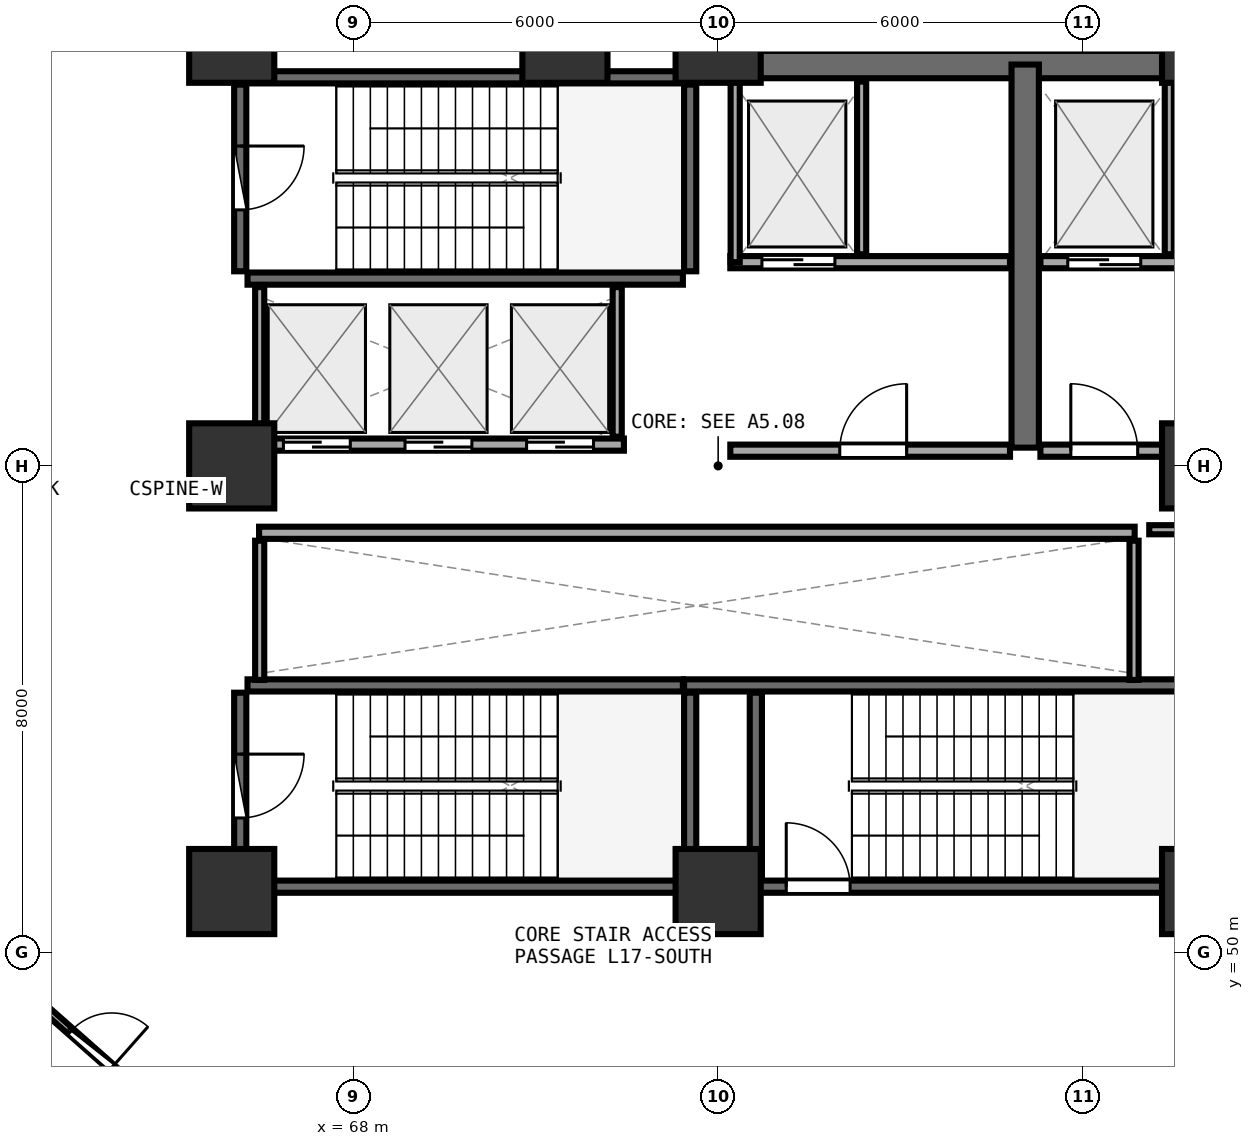
"""IFC4 building model, lengths in metres.
Left out: names, types, materials, properties, quantities, classifications, styles, units other than length and angle.
Written with IfcOpenShell. Run it as: python <this file> out.ifc"""

import sys

from ifc_helpers import new_model, si_unit, direction, frame, frame_2d, origin, origin_2d, place, context, subcontext, project, spatial, rectangle, extrude, element, fill, save


model = new_model("IFC4")
c1 = context("Model", 3, precision=1e-05, world=origin(), true_north=direction((0.0, 1.0)))
c2 = subcontext(c1, "Body", "Model", "MODEL_VIEW")
j1 = project(units=[si_unit("LENGTHUNIT", "METRE"), si_unit("PLANEANGLEUNIT", "RADIAN")], contexts=[c1])
p1 = place(None, origin())
s1 = spatial("IfcSite", under=j1, at=p1, CompositionType="ELEMENT")
p2 = place(p1, origin())
s2 = spatial("IfcBuilding", under=s1, at=p2, CompositionType="ELEMENT")
p3 = place(p2, frame((0.0, 0.0, 67.5)))
s3 = spatial("IfcBuildingStorey", under=s2, at=p3, CompositionType="ELEMENT", Elevation=67.5)
for number, where, z_axis, x_axis in (
    (1, (66.0, 51.0, 0.0), (0.0, 0.0, 1.0), (1.0, 0.0, 0.0)),
    (2, (74.0, 51.0, 0.0), (0.0, 0.0, 1.0), (1.0, 0.0, 0.0)),
    (3, (82.0, 51.0, 0.0), (0.0, 0.0, 1.0), (1.0, 0.0, 0.0)),
    (4, (82.0, 58.0, 0.0), (0.0, 0.0, 1.0), (1.0, 0.0, 0.0)),
    (5, (82.0, 65.0, 0.0), (0.0, 0.0, 1.0), (1.0, 0.0, 0.0)),
    (6, (74.0, 65.0, 0.0), (0.0, 0.0, 1.0), (1.0, 0.0, 0.0)),
    (7, (71.48, 65.0, 0.0), (0.0, 0.0, 1.0), (1.0, 0.0, 0.0)),
    (8, (66.0, 65.0, 0.0), (0.0, 0.0, 1.0), (1.0, 0.0, 0.0)),
    (9, (66.0, 58.0, 0.0), (0.0, 0.0, 1.0), (1.0, 0.0, 0.0)),
):
    element("IfcColumn", number, at=place(p3, frame(where, z_axis=z_axis, x_axis=x_axis)), inside=s3, PredefinedType="PILASTER", context=c2, shape_type="SweptSolid", body=[
        extrude(rectangle(XDim=1.4, YDim=1.4, at=origin_2d()), origin(), (0.0, 0.0, 1.0), 4.76),
    ])
p4 = place(p3, frame((66.26, 61.08, 0.0), z_axis=(0.0, 0.0, 1.0), x_axis=(1.0, 0.0, 0.0)))
e10 = element("IfcWall", 10, at=p4, inside=s3, PredefinedType="SHEAR", context=c2, shape_type="SweptSolid", body=[
    extrude(rectangle(XDim=7.16, YDim=0.2, at=frame_2d((3.58, 0.0))), origin(), (0.0, 0.0, 1.0), 4.36),
])
p5 = place(p3, frame((73.54, 61.2, 0.0), z_axis=(0.0, 0.0, 1.0), x_axis=(0.0, 1.0, 0.0)))
e11 = element("IfcWall", 11, at=p5, inside=s3, PredefinedType="SHEAR", context=c2, shape_type="SweptSolid", body=[
    extrude(rectangle(XDim=3.07, YDim=0.2, at=frame_2d((1.535, 0.0))), origin(), (0.0, 0.0, 1.0), 4.36),
])
p6 = place(p3, frame((73.42, 64.39, 0.0), z_axis=(0.0, 0.0, 1.0), x_axis=(-1.0, 0.0, 0.0)))
e12 = element("IfcWall", 12, at=p6, inside=s3, PredefinedType="SHEAR", context=c2, shape_type="SweptSolid", body=[
    extrude(rectangle(XDim=7.16, YDim=0.2, at=frame_2d((3.58, 0.0))), origin(), (0.0, 0.0, 1.0), 4.36),
])
p7 = place(p3, frame((66.14, 64.27, 0.0), z_axis=(0.0, 0.0, 1.0), x_axis=(0.0, -1.0, 0.0)))
e13 = element("IfcWall", 13, at=p7, inside=s3, PredefinedType="SHEAR", context=c2, shape_type="SweptSolid", body=[
    extrude(rectangle(XDim=3.07, YDim=0.2, at=frame_2d((1.535, 0.0))), origin(), (0.0, 0.0, 1.0), 4.36),
])
p8 = place(p7, frame((1.01, 0.0, 0.0)))
e14 = element("IfcOpeningElement", 14, at=p8, cuts=e13, PredefinedType="OPENING", context=c2, shape_type="SweptSolid", body=[
    extrude(rectangle(XDim=1.05, YDim=2.1, at=frame_2d((0.525, 1.05))), frame((0.0, 0.11, 0.0), z_axis=(0.0, -1.0, 0.0), x_axis=(1.0, 0.0, 0.0)), (0.0, 0.0, 1.0), 0.22),
])
p9 = place(p3, frame((74.0, 51.08, 0.0), z_axis=(0.0, 0.0, 1.0), x_axis=(1.0, 0.0, 0.0)))
e15 = element("IfcWall", 15, at=p9, inside=s3, PredefinedType="SHEAR", context=c2, shape_type="SweptSolid", body=[
    extrude(rectangle(XDim=7.9, YDim=0.2, at=frame_2d((3.95, 0.0))), origin(), (0.0, 0.0, 1.0), 4.36),
])
p10 = place(p9, frame((1.12, 0.0, 0.0)))
e16 = element("IfcOpeningElement", 16, at=p10, cuts=e15, PredefinedType="OPENING", context=c2, shape_type="SweptSolid", body=[
    extrude(rectangle(XDim=1.05, YDim=2.1, at=frame_2d((0.525, 1.05))), frame((0.0, 0.11, 0.0), z_axis=(0.0, -1.0, 0.0), x_axis=(1.0, 0.0, 0.0)), (0.0, 0.0, 1.0), 0.22),
])
p11 = place(p3, frame((81.9, 54.39, 0.0), z_axis=(0.0, 0.0, 1.0), x_axis=(-1.0, 0.0, 0.0)))
e17 = element("IfcWall", 17, at=p11, inside=s3, PredefinedType="SHEAR", context=c2, shape_type="SweptSolid", body=[
    extrude(rectangle(XDim=8.46, YDim=0.2, at=frame_2d((4.23, 0.0))), origin(), (0.0, 0.0, 1.0), 4.36),
])
p12 = place(p3, frame((74.62, 54.27, 0.0), z_axis=(0.0, 0.0, 1.0), x_axis=(0.0, -1.0, 0.0)))
e18 = element("IfcWall", 18, at=p12, inside=s3, PredefinedType="SHEAR", context=c2, shape_type="SweptSolid", body=[
    extrude(rectangle(XDim=3.07, YDim=0.2, at=frame_2d((1.535, 0.0))), origin(), (0.0, 0.0, 1.0), 4.36),
])
p13 = place(p3, frame((66.26, 51.08, 0.0), z_axis=(0.0, 0.0, 1.0), x_axis=(1.0, 0.0, 0.0)))
e19 = element("IfcWall", 19, at=p13, inside=s3, PredefinedType="SHEAR", context=c2, shape_type="SweptSolid", body=[
    extrude(rectangle(XDim=7.16, YDim=0.2, at=frame_2d((3.58, 0.0))), origin(), (0.0, 0.0, 1.0), 4.36),
])
p14 = place(p3, frame((73.54, 51.2, 0.0), z_axis=(0.0, 0.0, 1.0), x_axis=(0.0, 1.0, 0.0)))
e20 = element("IfcWall", 20, at=p14, inside=s3, PredefinedType="SHEAR", context=c2, shape_type="SweptSolid", body=[
    extrude(rectangle(XDim=3.07, YDim=0.2, at=frame_2d((1.535, 0.0))), origin(), (0.0, 0.0, 1.0), 4.36),
])
p15 = place(p3, frame((73.42, 54.39, 0.0), z_axis=(0.0, 0.0, 1.0), x_axis=(-1.0, 0.0, 0.0)))
e21 = element("IfcWall", 21, at=p15, inside=s3, PredefinedType="SHEAR", context=c2, shape_type="SweptSolid", body=[
    extrude(rectangle(XDim=7.16, YDim=0.2, at=frame_2d((3.58, 0.0))), origin(), (0.0, 0.0, 1.0), 4.36),
])
p16 = place(p3, frame((66.14, 54.27, 0.0), z_axis=(0.0, 0.0, 1.0), x_axis=(0.0, -1.0, 0.0)))
e22 = element("IfcWall", 22, at=p16, inside=s3, PredefinedType="SHEAR", context=c2, shape_type="SweptSolid", body=[
    extrude(rectangle(XDim=3.07, YDim=0.2, at=frame_2d((1.535, 0.0))), origin(), (0.0, 0.0, 1.0), 4.36),
])
p17 = place(p16, frame((1.01, 0.0, 0.0)))
e23 = element("IfcOpeningElement", 23, at=p17, cuts=e22, PredefinedType="OPENING", context=c2, shape_type="SweptSolid", body=[
    extrude(rectangle(XDim=1.05, YDim=2.1, at=frame_2d((0.525, 1.05))), frame((0.0, 0.11, 0.0), z_axis=(0.0, -1.0, 0.0), x_axis=(1.0, 0.0, 0.0)), (0.0, 0.0, 1.0), 0.22),
])
p18 = place(p3, frame((74.0, 64.6, 0.0), z_axis=(0.0, 0.0, 1.0), x_axis=(1.0, 0.0, 0.0)))
e24 = element("IfcWall", 24, at=p18, inside=s3, PredefinedType="SHEAR", context=c2, shape_type="SweptSolid", body=[
    extrude(rectangle(XDim=8.0, YDim=0.45, at=frame_2d((4.0, 0.0))), origin(), (0.0, 0.0, 1.0), 4.36),
])
p19 = place(p3, frame((79.05, 58.3, 0.0), z_axis=(0.0, 0.0, 1.0), x_axis=(0.0, 1.0, 0.0)))
e25 = element("IfcWall", 25, at=p19, inside=s3, PredefinedType="SHEAR", context=c2, shape_type="SweptSolid", body=[
    extrude(rectangle(XDim=6.3, YDim=0.45, at=frame_2d((3.15, 0.0))), origin(), (0.0, 0.0, 1.0), 4.36),
])
p20 = place(p3, frame((74.2, 61.35, 0.0), z_axis=(0.0, 0.0, 1.0), x_axis=(1.0, 0.0, 0.0)))
e26 = element("IfcWall", 26, at=p20, inside=s3, PredefinedType="SOLIDWALL", context=c2, shape_type="SweptSolid", body=[
    extrude(rectangle(XDim=4.6, YDim=0.2, at=frame_2d((2.3, 0.0))), origin(), (0.0, 0.0, 1.0), 4.35),
])
p21 = place(p20, frame((0.52, 0.0, 0.0)))
e27 = element("IfcOpeningElement", 27, at=p21, cuts=e26, PredefinedType="OPENING", context=c2, shape_type="SweptSolid", body=[
    extrude(rectangle(XDim=1.2, YDim=2.15, at=frame_2d((0.6, 1.075))), frame((0.0, 0.11, 0.0), z_axis=(0.0, -1.0, 0.0), x_axis=(1.0, 0.0, 0.0)), (0.0, 0.0, 1.0), 0.22),
])
p22 = place(p3, frame((74.28, 61.35, 0.0), z_axis=(0.0, 0.0, 1.0), x_axis=(0.0, 1.0, 0.0)))
e28 = element("IfcWall", 28, at=p22, inside=s3, PredefinedType="PARTITIONING", context=c2, shape_type="SweptSolid", body=[
    extrude(rectangle(XDim=2.97, YDim=0.15, at=frame_2d((1.485, 0.0))), origin(), (0.0, 0.0, 1.0), 4.35),
])
p23 = place(p3, frame((76.36, 61.48, 0.0), z_axis=(0.0, 0.0, 1.0), x_axis=(0.0, 1.0, 0.0)))
e29 = element("IfcWall", 29, at=p23, inside=s3, PredefinedType="PARTITIONING", context=c2, shape_type="SweptSolid", body=[
    extrude(rectangle(XDim=2.84, YDim=0.15, at=frame_2d((1.42, 0.0))), origin(), (0.0, 0.0, 1.0), 4.35),
])
p24 = place(p3, frame((79.3, 61.35, 0.0), z_axis=(0.0, 0.0, 1.0), x_axis=(1.0, 0.0, 0.0)))
e30 = element("IfcWall", 30, at=p24, inside=s3, PredefinedType="SOLIDWALL", context=c2, shape_type="SweptSolid", body=[
    extrude(rectangle(XDim=4.0, YDim=0.2, at=frame_2d((2.0, 0.0))), origin(), (0.0, 0.0, 1.0), 3.645),
])
p25 = place(p24, frame((0.45, 0.0, 0.0)))
e31 = element("IfcOpeningElement", 31, at=p25, cuts=e30, PredefinedType="OPENING", context=c2, shape_type="SweptSolid", body=[
    extrude(rectangle(XDim=1.2, YDim=2.15, at=frame_2d((0.6, 1.075))), frame((0.0, 0.11, 0.0), z_axis=(0.0, -1.0, 0.0), x_axis=(1.0, 0.0, 0.0)), (0.0, 0.0, 1.0), 0.22),
])
p26 = place(p3, frame((81.42, 61.48, 0.0), z_axis=(0.0, 0.0, 1.0), x_axis=(0.0, 1.0, 0.0)))
e32 = element("IfcWall", 32, at=p26, inside=s3, PredefinedType="PARTITIONING", context=c2, shape_type="SweptSolid", body=[
    extrude(rectangle(XDim=2.84, YDim=0.15, at=frame_2d((1.42, 0.0))), origin(), (0.0, 0.0, 1.0), 4.35),
])
p27 = place(p3, frame((74.2, 58.25, 0.0), z_axis=(0.0, 0.0, 1.0), x_axis=(1.0, 0.0, 0.0)))
e33 = element("IfcWall", 33, at=p27, inside=s3, PredefinedType="SOLIDWALL", context=c2, shape_type="SweptSolid", body=[
    extrude(rectangle(XDim=4.6, YDim=0.2, at=frame_2d((2.3, 0.0))), origin(), (0.0, 0.0, 1.0), 4.35),
])
p28 = place(p27, frame((1.8, 0.0, 0.0)))
e34 = element("IfcOpeningElement", 34, at=p28, cuts=e33, PredefinedType="OPENING", context=c2, shape_type="SweptSolid", body=[
    extrude(rectangle(XDim=1.1, YDim=2.1, at=frame_2d((0.55, 1.05))), frame((0.0, 0.11, 0.0), z_axis=(0.0, -1.0, 0.0), x_axis=(1.0, 0.0, 0.0)), (0.0, 0.0, 1.0), 0.22),
])
p29 = place(p3, frame((79.3, 58.25, 0.0), z_axis=(0.0, 0.0, 1.0), x_axis=(1.0, 0.0, 0.0)))
e35 = element("IfcWall", 35, at=p29, inside=s3, PredefinedType="SOLIDWALL", context=c2, shape_type="SweptSolid", body=[
    extrude(rectangle(XDim=4.0, YDim=0.2, at=frame_2d((2.0, 0.0))), origin(), (0.0, 0.0, 1.0), 2.345),
])
p30 = place(p29, frame((0.5, 0.0, 0.0)))
e36 = element("IfcOpeningElement", 36, at=p30, cuts=e35, PredefinedType="OPENING", context=c2, shape_type="SweptSolid", body=[
    extrude(rectangle(XDim=1.1, YDim=2.1, at=frame_2d((0.55, 1.05))), frame((0.0, 0.11, 0.0), z_axis=(0.0, -1.0, 0.0), x_axis=(1.0, 0.0, 0.0)), (0.0, 0.0, 1.0), 0.22),
])
p31 = place(p3, frame((66.45, 58.35, 0.0), z_axis=(0.0, 0.0, 1.0), x_axis=(1.0, 0.0, 0.0)))
e37 = element("IfcWall", 37, at=p31, inside=s3, PredefinedType="SOLIDWALL", context=c2, shape_type="SweptSolid", body=[
    extrude(rectangle(XDim=6.0, YDim=0.2, at=frame_2d((3.0, 0.0))), origin(), (0.0, 0.0, 1.0), 4.35),
])
p32 = place(p31, frame((0.4, 0.0, 0.0)))
e38 = element("IfcOpeningElement", 38, at=p32, cuts=e37, PredefinedType="OPENING", context=c2, shape_type="SweptSolid", body=[
    extrude(rectangle(XDim=1.1, YDim=2.1, at=frame_2d((0.55, 1.05))), frame((0.0, 0.11, 0.0), z_axis=(0.0, -1.0, 0.0), x_axis=(1.0, 0.0, 0.0)), (0.0, 0.0, 1.0), 0.22),
])
p33 = place(p31, frame((2.4, 0.0, 0.0)))
e39 = element("IfcOpeningElement", 39, at=p33, cuts=e37, PredefinedType="OPENING", context=c2, shape_type="SweptSolid", body=[
    extrude(rectangle(XDim=1.1, YDim=2.1, at=frame_2d((0.55, 1.05))), frame((0.0, 0.11, 0.0), z_axis=(0.0, -1.0, 0.0), x_axis=(1.0, 0.0, 0.0)), (0.0, 0.0, 1.0), 0.22),
])
p34 = place(p31, frame((4.4, 0.0, 0.0)))
e40 = element("IfcOpeningElement", 40, at=p34, cuts=e37, PredefinedType="OPENING", context=c2, shape_type="SweptSolid", body=[
    extrude(rectangle(XDim=1.1, YDim=2.1, at=frame_2d((0.55, 1.05))), frame((0.0, 0.11, 0.0), z_axis=(0.0, -1.0, 0.0), x_axis=(1.0, 0.0, 0.0)), (0.0, 0.0, 1.0), 0.22),
])
for number, where, z_axis, x_axis in (
    (41, (66.46, 58.48, 0.0), (0.0, 0.0, 1.0), (0.0, 1.0, 0.0)),
    (42, (72.34, 58.48, 0.0), (0.0, 0.0, 1.0), (0.0, 1.0, 0.0)),
):
    element("IfcWall", number, at=place(p3, frame(where, z_axis=z_axis, x_axis=x_axis)), inside=s3, PredefinedType="PARTITIONING", context=c2, shape_type="SweptSolid", body=[
        extrude(rectangle(XDim=2.46, YDim=0.15, at=frame_2d((1.23, 0.0))), origin(), (0.0, 0.0, 1.0), 4.35),
    ])
p35 = place(p3, frame((66.45, 56.9, 0.0), z_axis=(0.0, 0.0, 1.0), x_axis=(1.0, 0.0, 0.0)))
e43 = element("IfcWall", 43, at=p35, inside=s3, PredefinedType="SOLIDWALL", context=c2, shape_type="SweptSolid", body=[
    extrude(rectangle(XDim=14.4, YDim=0.2, at=frame_2d((7.2, 0.0))), origin(), (0.0, 0.0, 1.0), 4.35),
])
for number, where, z_axis, x_axis in (
    (44, (66.46, 54.48, 0.0), (0.0, 0.0, 1.0), (0.0, 1.0, 0.0)),
    (45, (80.84, 54.48, 0.0), (0.0, 0.0, 1.0), (0.0, 1.0, 0.0)),
):
    element("IfcWall", number, at=place(p3, frame(where, z_axis=z_axis, x_axis=x_axis)), inside=s3, PredefinedType="PARTITIONING", context=c2, shape_type="SweptSolid", body=[
        extrude(rectangle(XDim=2.29, YDim=0.15, at=frame_2d((1.145, 0.0))), origin(), (0.0, 0.0, 1.0), 4.35),
    ])
p36 = place(p3, frame((61.763, 50.103, 0.0), z_axis=(0.0, 0.0, 1.0), x_axis=(0.749467713759, -0.662040894532, 0.0)))
e46 = element("IfcWall", 46, at=p36, inside=s3, PredefinedType="PARTITIONING", context=c2, shape_type="SweptSolid", body=[
    extrude(rectangle(XDim=5.141, YDim=0.12, at=frame_2d((2.571, 0.0))), origin(), (0.0, 0.0, 1.0), 2.345),
])
p37 = place(p36, frame((2.121, 0.0, 0.0)))
e47 = element("IfcOpeningElement", 47, at=p37, cuts=e46, PredefinedType="OPENING", context=c2, shape_type="SweptSolid", body=[
    extrude(rectangle(XDim=0.9, YDim=2.08, at=frame_2d((0.45, 1.04))), frame((0.0, 0.07, 0.0), z_axis=(0.0, -1.0, 0.0), x_axis=(1.0, 0.0, 0.0)), (0.0, 0.0, 1.0), 0.14),
])
p38 = place(p3, frame((82.64, 56.95, 0.0), z_axis=(0.0, 0.0, 1.0), x_axis=(-1.0, 0.0, 0.0)))
e48 = element("IfcWall", 48, at=p38, inside=s3, PredefinedType="PARTITIONING", context=c2, shape_type="SweptSolid", body=[
    extrude(rectangle(XDim=1.55, YDim=0.15, at=frame_2d((0.775, 0.0))), origin(), (0.0, 0.0, 1.0), 3.645),
])
p39 = place(p8, origin())
e49 = element("IfcDoor", 49, at=p39, inside=s3, OperationType="SINGLE_SWING_LEFT", PredefinedType="DOOR", context=c2, shape_type="SweptSolid", body=[
    extrude(rectangle(XDim=1.05, YDim=2.1, at=frame_2d((0.525, 1.05))), frame((0.0, 0.025, 0.0), z_axis=(0.0, -1.0, 0.0), x_axis=(1.0, 0.0, 0.0)), (0.0, 0.0, 1.0), 0.05),
])
fill(e14, e49)
p40 = place(p10, origin())
e50 = element("IfcDoor", 50, at=p40, inside=s3, OperationType="SINGLE_SWING_LEFT", PredefinedType="DOOR", context=c2, shape_type="SweptSolid", body=[
    extrude(rectangle(XDim=1.05, YDim=2.1, at=frame_2d((0.525, 1.05))), frame((0.0, 0.025, 0.0), z_axis=(0.0, -1.0, 0.0), x_axis=(1.0, 0.0, 0.0)), (0.0, 0.0, 1.0), 0.05),
])
fill(e16, e50)
p41 = place(p17, origin())
e51 = element("IfcDoor", 51, at=p41, inside=s3, OperationType="SINGLE_SWING_LEFT", PredefinedType="DOOR", context=c2, shape_type="SweptSolid", body=[
    extrude(rectangle(XDim=1.05, YDim=2.1, at=frame_2d((0.525, 1.05))), frame((0.0, 0.025, 0.0), z_axis=(0.0, -1.0, 0.0), x_axis=(1.0, 0.0, 0.0)), (0.0, 0.0, 1.0), 0.05),
])
fill(e23, e51)
p42 = place(p21, origin())
e52 = element("IfcDoor", 52, at=p42, inside=s3, OperationType="DOUBLE_DOOR_SLIDING", PredefinedType="DOOR", context=c2, shape_type="SweptSolid", body=[
    extrude(rectangle(XDim=1.2, YDim=2.15, at=frame_2d((0.6, 1.075))), frame((0.0, 0.025, 0.0), z_axis=(0.0, -1.0, 0.0), x_axis=(1.0, 0.0, 0.0)), (0.0, 0.0, 1.0), 0.05),
])
fill(e27, e52)
p43 = place(p25, origin())
e53 = element("IfcDoor", 53, at=p43, inside=s3, OperationType="DOUBLE_DOOR_SLIDING", PredefinedType="DOOR", context=c2, shape_type="SweptSolid", body=[
    extrude(rectangle(XDim=1.2, YDim=2.15, at=frame_2d((0.6, 1.075))), frame((0.0, 0.025, 0.0), z_axis=(0.0, -1.0, 0.0), x_axis=(1.0, 0.0, 0.0)), (0.0, 0.0, 1.0), 0.05),
])
fill(e31, e53)
p44 = place(p28, frame((1.1, 0.0, 0.0), z_axis=(0.0, 0.0, 1.0), x_axis=(-1.0, 0.0, 0.0)))
e54 = element("IfcDoor", 54, at=p44, inside=s3, OperationType="SINGLE_SWING_LEFT", PredefinedType="DOOR", context=c2, shape_type="SweptSolid", body=[
    extrude(rectangle(XDim=1.1, YDim=2.1, at=frame_2d((0.55, 1.05))), frame((0.0, 0.025, 0.0), z_axis=(0.0, -1.0, 0.0), x_axis=(1.0, 0.0, 0.0)), (0.0, 0.0, 1.0), 0.05),
])
fill(e34, e54)
p45 = place(p30, frame((1.1, 0.0, 0.0), z_axis=(0.0, 0.0, 1.0), x_axis=(-1.0, 0.0, 0.0)))
e55 = element("IfcDoor", 55, at=p45, inside=s3, OperationType="SINGLE_SWING_RIGHT", PredefinedType="DOOR", context=c2, shape_type="SweptSolid", body=[
    extrude(rectangle(XDim=1.1, YDim=2.1, at=frame_2d((0.55, 1.05))), frame((0.0, 0.025, 0.0), z_axis=(0.0, -1.0, 0.0), x_axis=(1.0, 0.0, 0.0)), (0.0, 0.0, 1.0), 0.05),
])
fill(e36, e55)
p46 = place(p32, origin())
e56 = element("IfcDoor", 56, at=p46, inside=s3, OperationType="DOUBLE_DOOR_SLIDING", PredefinedType="DOOR", context=c2, shape_type="SweptSolid", body=[
    extrude(rectangle(XDim=1.1, YDim=2.1, at=frame_2d((0.55, 1.05))), frame((0.0, 0.025, 0.0), z_axis=(0.0, -1.0, 0.0), x_axis=(1.0, 0.0, 0.0)), (0.0, 0.0, 1.0), 0.05),
])
fill(e38, e56)
p47 = place(p33, origin())
e57 = element("IfcDoor", 57, at=p47, inside=s3, OperationType="DOUBLE_DOOR_SLIDING", PredefinedType="DOOR", context=c2, shape_type="SweptSolid", body=[
    extrude(rectangle(XDim=1.1, YDim=2.1, at=frame_2d((0.55, 1.05))), frame((0.0, 0.025, 0.0), z_axis=(0.0, -1.0, 0.0), x_axis=(1.0, 0.0, 0.0)), (0.0, 0.0, 1.0), 0.05),
])
fill(e39, e57)
p48 = place(p34, origin())
e58 = element("IfcDoor", 58, at=p48, inside=s3, OperationType="DOUBLE_DOOR_SLIDING", PredefinedType="DOOR", context=c2, shape_type="SweptSolid", body=[
    extrude(rectangle(XDim=1.1, YDim=2.1, at=frame_2d((0.55, 1.05))), frame((0.0, 0.025, 0.0), z_axis=(0.0, -1.0, 0.0), x_axis=(1.0, 0.0, 0.0)), (0.0, 0.0, 1.0), 0.05),
])
fill(e40, e58)
p49 = place(p37, origin())
e59 = element("IfcDoor", 59, at=p49, inside=s3, OperationType="SINGLE_SWING_RIGHT", PredefinedType="DOOR", context=c2, shape_type="SweptSolid", body=[
    extrude(rectangle(XDim=0.9, YDim=2.08, at=frame_2d((0.45, 1.04))), frame((0.0, 0.025, 0.0), z_axis=(0.0, -1.0, 0.0), x_axis=(1.0, 0.0, 0.0)), (0.0, 0.0, 1.0), 0.05),
])
fill(e47, e59)
save(model, sys.argv[1])
